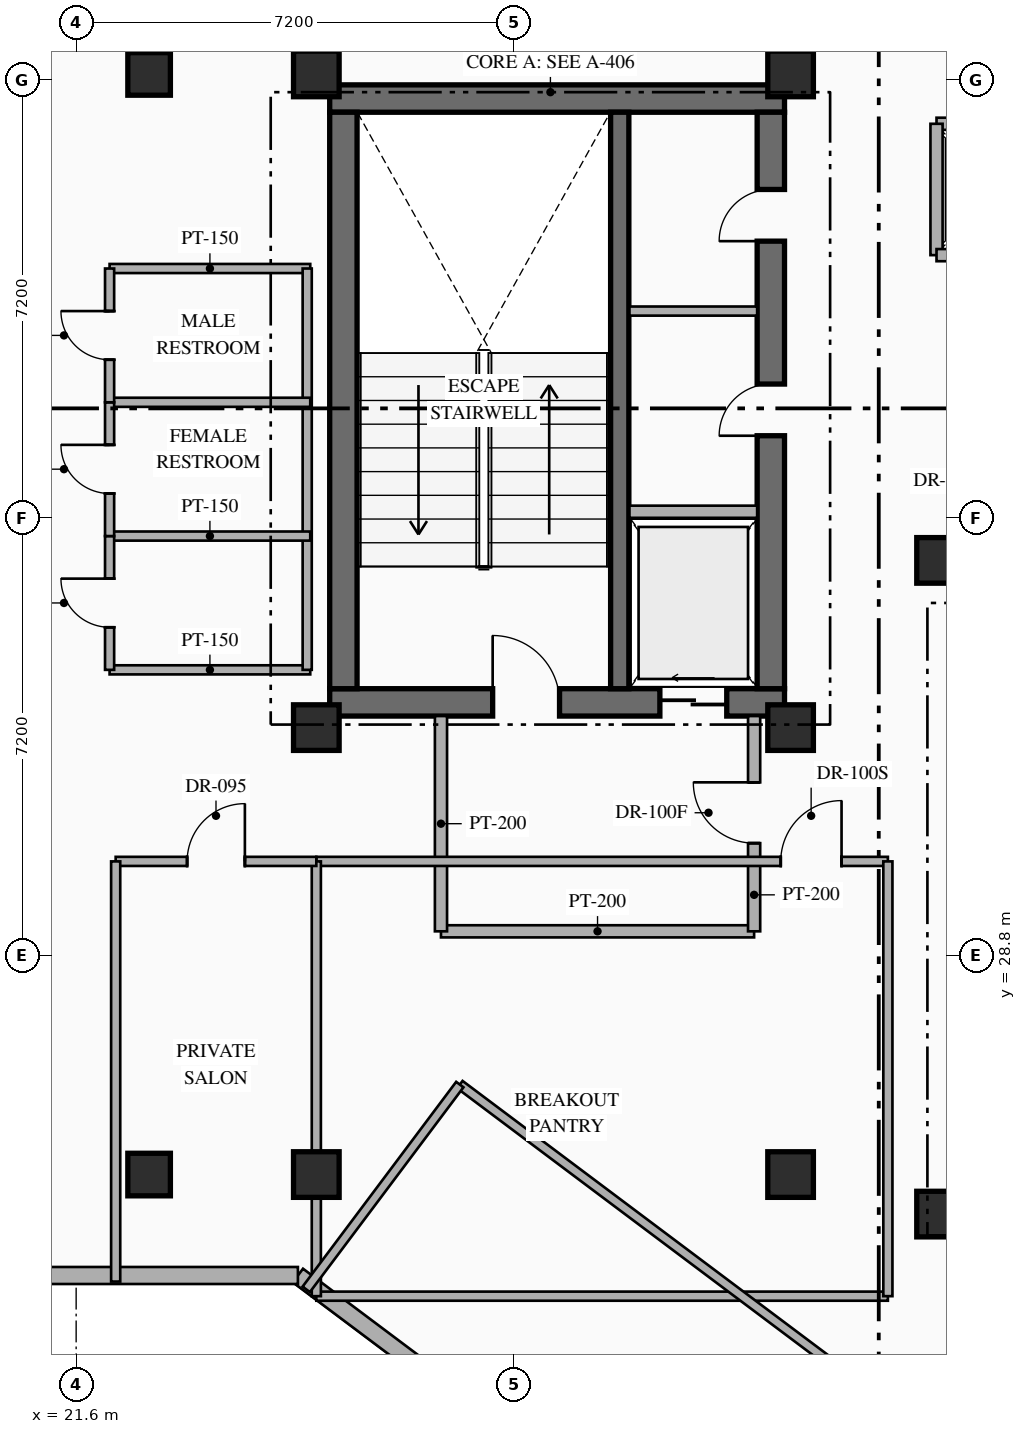
"""IFC4 building model, lengths in metres.
Left out: names, types, materials, properties, quantities, classifications, styles, units other than length and angle.
Written with IfcOpenShell. Run it as: python <this file> out.ifc"""

import sys

from ifc_helpers import new_model, si_unit, direction, frame, frame_2d, origin, origin_2d, place, context, subcontext, project, spatial, rectangle, hollow_rectangle, extrude, element, fill, save


model = new_model("IFC4")
c1 = context("Model", 3, precision=1e-05, world=origin(), true_north=direction((0.0, 1.0)))
c2 = subcontext(c1, "Body", "Model", "MODEL_VIEW")
j1 = project(units=[si_unit("LENGTHUNIT", "METRE"), si_unit("PLANEANGLEUNIT", "RADIAN")], contexts=[c1])
p1 = place(None, origin())
s1 = spatial("IfcSite", under=j1, at=p1, CompositionType="ELEMENT")
p2 = place(p1, origin())
s2 = spatial("IfcBuilding", under=s1, at=p2, CompositionType="ELEMENT")
p3 = place(p2, frame((0.0, 0.0, 191.55)))
s3 = spatial("IfcBuildingStorey", under=s2, at=p3, CompositionType="ELEMENT", Elevation=191.55)
p4 = place(p3, frame((25.77, 32.965, 0.0), z_axis=(0.0, 0.0, 1.0), x_axis=(1.0, 0.0, 0.0)))
e1 = element("IfcWall", 1, at=p4, inside=s3, PredefinedType="SHEAR", context=c2, shape_type="SweptSolid", body=[
    extrude(rectangle(XDim=7.48, YDim=0.45, at=frame_2d((3.74, 0.0))), origin(), (0.0, 0.0, 1.0), 3.6),
])
p5 = place(p4, frame((2.68, 0.0, 0.0)))
e2 = element("IfcOpeningElement", 2, at=p5, cuts=e1, PredefinedType="OPENING", context=c2, shape_type="SweptSolid", body=[
    extrude(rectangle(XDim=1.1, YDim=2.2, at=frame_2d((0.55, 1.1))), frame((0.0, 0.235, 0.0), z_axis=(0.0, -1.0, 0.0), x_axis=(1.0, 0.0, 0.0)), (0.0, 0.0, 1.0), 0.47),
])
p6 = place(p4, frame((5.43, 0.0, 0.0)))
e3 = element("IfcOpeningElement", 3, at=p6, cuts=e1, PredefinedType="OPENING", context=c2, shape_type="SweptSolid", body=[
    extrude(rectangle(XDim=1.1, YDim=2.15, at=frame_2d((0.55, 1.075))), frame((0.0, 0.235, 0.0), z_axis=(0.0, -1.0, 0.0), x_axis=(1.0, 0.0, 0.0)), (0.0, 0.0, 1.0), 0.47),
])
p7 = place(p3, frame((25.77, 42.895, 0.0), z_axis=(0.0, 0.0, 1.0), x_axis=(1.0, 0.0, 0.0)))
e4 = element("IfcWall", 4, at=p7, inside=s3, PredefinedType="SHEAR", context=c2, shape_type="SweptSolid", body=[
    extrude(rectangle(XDim=7.48, YDim=0.45, at=frame_2d((3.74, 0.0))), origin(), (0.0, 0.0, 1.0), 3.6),
])
p8 = place(p3, frame((25.995, 33.19, 0.0), z_axis=(0.0, 0.0, 1.0), x_axis=(0.0, 1.0, 0.0)))
e5 = element("IfcWall", 5, at=p8, inside=s3, PredefinedType="SHEAR", context=c2, shape_type="SweptSolid", body=[
    extrude(rectangle(XDim=9.48, YDim=0.45, at=frame_2d((4.74, 0.0))), origin(), (0.0, 0.0, 1.0), 3.6),
])
p9 = place(p3, frame((33.025, 33.19, 0.0), z_axis=(0.0, 0.0, 1.0), x_axis=(0.0, 1.0, 0.0)))
e6 = element("IfcWall", 6, at=p9, inside=s3, PredefinedType="SHEAR", context=c2, shape_type="SweptSolid", body=[
    extrude(rectangle(XDim=9.48, YDim=0.45, at=frame_2d((4.74, 0.0))), origin(), (0.0, 0.0, 1.0), 3.6),
])
p10 = place(p9, frame((4.16, 0.0, 0.0)))
e7 = element("IfcOpeningElement", 7, at=p10, cuts=e6, PredefinedType="OPENING", context=c2, shape_type="SweptSolid", body=[
    extrude(rectangle(XDim=0.85, YDim=2.08, at=frame_2d((0.425, 1.04))), frame((0.0, 0.235, 0.0), z_axis=(0.0, -1.0, 0.0), x_axis=(1.0, 0.0, 0.0)), (0.0, 0.0, 1.0), 0.47),
])
p11 = place(p9, frame((7.36, 0.0, 0.0)))
e8 = element("IfcOpeningElement", 8, at=p11, cuts=e6, PredefinedType="OPENING", context=c2, shape_type="SweptSolid", body=[
    extrude(rectangle(XDim=0.85, YDim=2.08, at=frame_2d((0.425, 1.04))), frame((0.0, 0.235, 0.0), z_axis=(0.0, -1.0, 0.0), x_axis=(1.0, 0.0, 0.0)), (0.0, 0.0, 1.0), 0.47),
])
p12 = place(p3, frame((30.54, 33.19, 0.0), z_axis=(0.0, 0.0, 1.0), x_axis=(0.0, 1.0, 0.0)))
e9 = element("IfcWall", 9, at=p12, inside=s3, PredefinedType="SHEAR", context=c2, shape_type="SweptSolid", body=[
    extrude(rectangle(XDim=9.48, YDim=0.3, at=frame_2d((4.74, 0.0))), origin(), (0.0, 0.0, 1.0), 3.6),
])
for number, where, z_axis, x_axis in (
    (10, (25.55, 32.55, 0.0), (0.0, 0.0, 1.0), (1.0, 0.0, 0.0)),
    (11, (33.35, 32.55, 0.0), (0.0, 0.0, 1.0), (1.0, 0.0, 0.0)),
    (12, (25.55, 43.3, 0.0), (0.0, 0.0, 1.0), (1.0, 0.0, 0.0)),
    (13, (33.35, 43.3, 0.0), (0.0, 0.0, 1.0), (1.0, 0.0, 0.0)),
    (14, (35.8, 24.55, 0.0), (0.0, 0.0, 1.0), (1.0, 0.0, 0.0)),
    (15, (35.8, 35.3, 0.0), (0.0, 0.0, 1.0), (1.0, 0.0, 0.0)),
    (16, (25.55, 25.2, 0.0), (0.0, 0.0, 1.0), (1.0, 0.0, 0.0)),
    (17, (33.35, 25.2, 0.0), (0.0, 0.0, 1.0), (1.0, 0.0, 0.0)),
):
    element("IfcColumn", number, at=place(p3, frame(where, z_axis=z_axis, x_axis=x_axis)), inside=s3, PredefinedType="COLUMN", context=c2, shape_type="SweptSolid", body=[
        extrude(hollow_rectangle(XDim=0.75, YDim=0.75, WallThickness=0.028, at=origin_2d()), origin(), (0.0, 0.0, 1.0), 3.6),
    ])
for number, where, z_axis, x_axis in (
    (18, (22.8, 25.2, 0.0), (0.0, 0.0, 1.0), (1.0, 0.0, 0.0)),
    (19, (22.8, 43.3, 0.0), (0.0, 0.0, 1.0), (1.0, 0.0, 0.0)),
):
    element("IfcColumn", number, at=place(p3, frame(where, z_axis=z_axis, x_axis=x_axis)), inside=s3, PredefinedType="COLUMN", context=c2, shape_type="SweptSolid", body=[
        extrude(hollow_rectangle(XDim=0.7, YDim=0.7, WallThickness=0.028, at=origin_2d()), origin(), (0.0, 0.0, 1.0), 3.6),
    ])
p13 = place(p3, frame((44.918, 8.787, 0.0), z_axis=(0.0, 0.0, 1.0), x_axis=(-0.800004765927, 0.599993645378, 0.0)))
e20 = element("IfcWall", 20, at=p13, inside=s3, PredefinedType="STANDARD", context=c2, shape_type="SweptSolid", body=[
    extrude(rectangle(XDim=24.588, YDim=0.28, at=frame_2d((12.294, 0.0))), origin(), (0.0, 0.0, 1.0), 3.35),
])
p14 = place(p3, frame((25.247, 23.54, 0.0), z_axis=(0.0, 0.0, 1.0), x_axis=(-1.0, 0.0, 0.0)))
e21 = element("IfcWall", 21, at=p14, inside=s3, PredefinedType="STANDARD", context=c2, shape_type="SweptSolid", body=[
    extrude(rectangle(XDim=4.789, YDim=0.28, at=frame_2d((2.395, 0.0))), origin(), (0.0, 0.0, 1.0), 3.35),
])
p15 = place(p3, frame((30.7, 36.1, 0.0), z_axis=(0.0, 0.0, 1.0), x_axis=(1.0, 0.0, 0.0)))
e22 = element("IfcWall", 22, at=p15, inside=s3, PredefinedType="STANDARD", context=c2, shape_type="SweptSolid", body=[
    extrude(rectangle(XDim=2.1, YDim=0.2, at=frame_2d((1.05, 0.0))), origin(), (0.0, 0.0, 1.0), 3.35),
])
p16 = place(p3, frame((30.7, 39.4, 0.0), z_axis=(0.0, 0.0, 1.0), x_axis=(1.0, 0.0, 0.0)))
e23 = element("IfcWall", 23, at=p16, inside=s3, PredefinedType="PARTITIONING", context=c2, shape_type="SweptSolid", body=[
    extrude(rectangle(XDim=2.1, YDim=0.15, at=frame_2d((1.05, 0.0))), origin(), (0.0, 0.0, 1.0), 3.35),
])
p17 = place(p3, frame((27.6, 29.2, 0.0), z_axis=(0.0, 0.0, 1.0), x_axis=(1.0, 0.0, 0.0)))
e24 = element("IfcWall", 24, at=p17, inside=s3, PredefinedType="STANDARD", context=c2, shape_type="SweptSolid", body=[
    extrude(rectangle(XDim=5.15, YDim=0.2, at=frame_2d((2.575, 0.0))), origin(), (0.0, 0.0, 1.0), 3.35),
])
p18 = place(p3, frame((27.6, 29.2, 0.0), z_axis=(0.0, 0.0, 1.0), x_axis=(0.0, 1.0, 0.0)))
e25 = element("IfcWall", 25, at=p18, inside=s3, PredefinedType="STANDARD", context=c2, shape_type="SweptSolid", body=[
    extrude(rectangle(XDim=3.54, YDim=0.2, at=frame_2d((1.77, 0.0))), origin(), (0.0, 0.0, 1.0), 3.35),
])
p19 = place(p3, frame((32.75, 29.2, 0.0), z_axis=(0.0, 0.0, 1.0), x_axis=(0.0, 1.0, 0.0)))
e26 = element("IfcWall", 26, at=p19, inside=s3, PredefinedType="STANDARD", context=c2, shape_type="SweptSolid", body=[
    extrude(rectangle(XDim=3.54, YDim=0.2, at=frame_2d((1.77, 0.0))), origin(), (0.0, 0.0, 1.0), 3.35),
])
p20 = place(p19, frame((1.45, 0.0, 0.0)))
e27 = element("IfcOpeningElement", 27, at=p20, cuts=e26, PredefinedType="OPENING", context=c2, shape_type="SweptSolid", body=[
    extrude(rectangle(XDim=1.0, YDim=2.2, at=frame_2d((0.5, 1.1))), frame((0.0, 0.11, 0.0), z_axis=(0.0, -1.0, 0.0), x_axis=(1.0, 0.0, 0.0)), (0.0, 0.0, 1.0), 0.22),
])
p21 = place(p3, frame((35.75, 42.48, 0.0), z_axis=(0.0, 0.0, 1.0), x_axis=(1.0, 0.0, 0.0)))
e28 = element("IfcWall", 28, at=p21, inside=s3, PredefinedType="STANDARD", context=c2, shape_type="SweptSolid", body=[
    extrude(rectangle(XDim=9.11, YDim=0.2, at=frame_2d((4.555, 0.0))), origin(), (0.0, 0.0, 1.0), 3.35),
])
p22 = place(p3, frame((35.75, 40.32, 0.0), z_axis=(0.0, 0.0, 1.0), x_axis=(0.0, 1.0, 0.0)))
e29 = element("IfcWall", 29, at=p22, inside=s3, PredefinedType="STANDARD", context=c2, shape_type="SweptSolid", body=[
    extrude(rectangle(XDim=2.16, YDim=0.2, at=frame_2d((1.08, 0.0))), origin(), (0.0, 0.0, 1.0), 3.35),
])
p23 = place(p3, frame((35.75, 40.32, 0.0), z_axis=(0.0, 0.0, 1.0), x_axis=(1.0, 0.0, 0.0)))
e30 = element("IfcWall", 30, at=p23, inside=s3, PredefinedType="STANDARD", context=c2, shape_type="SweptSolid", body=[
    extrude(rectangle(XDim=9.11, YDim=0.2, at=frame_2d((4.555, 0.0))), origin(), (0.0, 0.0, 1.0), 3.35),
])
p24 = place(p23, frame((0.53, 0.0, 0.0)))
e31 = element("IfcOpeningElement", 31, at=p24, cuts=e30, PredefinedType="OPENING", context=c2, shape_type="SweptSolid", body=[
    extrude(rectangle(XDim=1.1, YDim=2.18, at=frame_2d((0.55, 1.09))), frame((0.0, 0.11, 0.0), z_axis=(0.0, -1.0, 0.0), x_axis=(1.0, 0.0, 0.0)), (0.0, 0.0, 1.0), 0.22),
])
p25 = place(p23, frame((2.73, 0.0, 0.0)))
e32 = element("IfcOpeningElement", 32, at=p25, cuts=e30, PredefinedType="OPENING", context=c2, shape_type="SweptSolid", body=[
    extrude(rectangle(XDim=1.1, YDim=2.18, at=frame_2d((0.55, 1.09))), frame((0.0, 0.11, 0.0), z_axis=(0.0, -1.0, 0.0), x_axis=(1.0, 0.0, 0.0)), (0.0, 0.0, 1.0), 0.22),
])
p26 = place(p23, frame((4.93, 0.0, 0.0)))
e33 = element("IfcOpeningElement", 33, at=p26, cuts=e30, PredefinedType="OPENING", context=c2, shape_type="SweptSolid", body=[
    extrude(rectangle(XDim=1.1, YDim=2.18, at=frame_2d((0.55, 1.09))), frame((0.0, 0.11, 0.0), z_axis=(0.0, -1.0, 0.0), x_axis=(1.0, 0.0, 0.0)), (0.0, 0.0, 1.0), 0.22),
])
p27 = place(p23, frame((7.13, 0.0, 0.0)))
e34 = element("IfcOpeningElement", 34, at=p27, cuts=e30, PredefinedType="OPENING", context=c2, shape_type="SweptSolid", body=[
    extrude(rectangle(XDim=1.1, YDim=2.18, at=frame_2d((0.55, 1.09))), frame((0.0, 0.11, 0.0), z_axis=(0.0, -1.0, 0.0), x_axis=(1.0, 0.0, 0.0)), (0.0, 0.0, 1.0), 0.22),
])
for number, where, z_axis, x_axis in (
    (35, (22.15, 33.5, 0.0), (0.0, 0.0, 1.0), (1.0, 0.0, 0.0)),
    (36, (22.15, 40.1, 0.0), (0.0, 0.0, 1.0), (1.0, 0.0, 0.0)),
):
    element("IfcWall", number, at=place(p3, frame(where, z_axis=z_axis, x_axis=x_axis)), inside=s3, PredefinedType="PARTITIONING", context=c2, shape_type="SweptSolid", body=[
        extrude(rectangle(XDim=3.3, YDim=0.15, at=frame_2d((1.65, 0.0))), origin(), (0.0, 0.0, 1.0), 3.35),
    ])
p28 = place(p3, frame((25.4, 33.5, 0.0), z_axis=(0.0, 0.0, 1.0), x_axis=(0.0, 1.0, 0.0)))
e37 = element("IfcWall", 37, at=p28, inside=s3, PredefinedType="PARTITIONING", context=c2, shape_type="SweptSolid", body=[
    extrude(rectangle(XDim=6.6, YDim=0.15, at=frame_2d((3.3, 0.0))), origin(), (0.0, 0.0, 1.0), 3.35),
])
for number, where, z_axis, x_axis in (
    (38, (22.15, 35.7, 0.0), (0.0, 0.0, 1.0), (1.0, 0.0, 0.0)),
    (39, (22.15, 37.9, 0.0), (0.0, 0.0, 1.0), (1.0, 0.0, 0.0)),
):
    element("IfcWall", number, at=place(p3, frame(where, z_axis=z_axis, x_axis=x_axis)), inside=s3, PredefinedType="PARTITIONING", context=c2, shape_type="SweptSolid", body=[
        extrude(rectangle(XDim=3.3, YDim=0.15, at=frame_2d((1.65, 0.0))), origin(), (0.0, 0.0, 1.0), 3.35),
    ])
p29 = place(p3, frame((22.15, 33.5, 0.0), z_axis=(0.0, 0.0, 1.0), x_axis=(0.0, 1.0, 0.0)))
e40 = element("IfcWall", 40, at=p29, inside=s3, PredefinedType="PARTITIONING", context=c2, shape_type="SweptSolid", body=[
    extrude(rectangle(XDim=2.2, YDim=0.15, at=frame_2d((1.1, 0.0))), origin(), (0.0, 0.0, 1.0), 3.35),
])
p30 = place(p29, frame((0.7, 0.0, 0.0)))
e41 = element("IfcOpeningElement", 41, at=p30, cuts=e40, PredefinedType="OPENING", context=c2, shape_type="SweptSolid", body=[
    extrude(rectangle(XDim=0.8, YDim=2.06, at=frame_2d((0.4, 1.03))), frame((0.0, 0.085, 0.0), z_axis=(0.0, -1.0, 0.0), x_axis=(1.0, 0.0, 0.0)), (0.0, 0.0, 1.0), 0.17),
])
p31 = place(p3, frame((22.15, 35.7, 0.0), z_axis=(0.0, 0.0, 1.0), x_axis=(0.0, 1.0, 0.0)))
e42 = element("IfcWall", 42, at=p31, inside=s3, PredefinedType="PARTITIONING", context=c2, shape_type="SweptSolid", body=[
    extrude(rectangle(XDim=2.2, YDim=0.15, at=frame_2d((1.1, 0.0))), origin(), (0.0, 0.0, 1.0), 3.35),
])
p32 = place(p31, frame((0.7, 0.0, 0.0)))
e43 = element("IfcOpeningElement", 43, at=p32, cuts=e42, PredefinedType="OPENING", context=c2, shape_type="SweptSolid", body=[
    extrude(rectangle(XDim=0.8, YDim=2.06, at=frame_2d((0.4, 1.03))), frame((0.0, 0.085, 0.0), z_axis=(0.0, -1.0, 0.0), x_axis=(1.0, 0.0, 0.0)), (0.0, 0.0, 1.0), 0.17),
])
p33 = place(p3, frame((22.15, 37.9, 0.0), z_axis=(0.0, 0.0, 1.0), x_axis=(0.0, 1.0, 0.0)))
e44 = element("IfcWall", 44, at=p33, inside=s3, PredefinedType="PARTITIONING", context=c2, shape_type="SweptSolid", body=[
    extrude(rectangle(XDim=2.2, YDim=0.15, at=frame_2d((1.1, 0.0))), origin(), (0.0, 0.0, 1.0), 3.35),
])
p34 = place(p33, frame((0.7, 0.0, 0.0)))
e45 = element("IfcOpeningElement", 45, at=p34, cuts=e44, PredefinedType="OPENING", context=c2, shape_type="SweptSolid", body=[
    extrude(rectangle(XDim=0.8, YDim=2.06, at=frame_2d((0.4, 1.03))), frame((0.0, 0.085, 0.0), z_axis=(0.0, -1.0, 0.0), x_axis=(1.0, 0.0, 0.0)), (0.0, 0.0, 1.0), 0.17),
])
p35 = place(p3, frame((25.55, 23.2, 0.0), z_axis=(0.0, 0.0, 1.0), x_axis=(1.0, 0.0, 0.0)))
e46 = element("IfcWall", 46, at=p35, inside=s3, PredefinedType="PARTITIONING", context=c2, shape_type="SweptSolid", body=[
    extrude(rectangle(XDim=9.4, YDim=0.15, at=frame_2d((4.7, 0.0))), origin(), (0.0, 0.0, 1.0), 3.35),
])
p36 = place(p3, frame((25.55, 30.35, 0.0), z_axis=(0.0, 0.0, 1.0), x_axis=(1.0, 0.0, 0.0)))
e47 = element("IfcWall", 47, at=p36, inside=s3, PredefinedType="PARTITIONING", context=c2, shape_type="SweptSolid", body=[
    extrude(rectangle(XDim=9.4, YDim=0.15, at=frame_2d((4.7, 0.0))), origin(), (0.0, 0.0, 1.0), 3.35),
])
p37 = place(p36, frame((7.638, 0.0, 0.0)))
e48 = element("IfcOpeningElement", 48, at=p37, cuts=e47, PredefinedType="OPENING", context=c2, shape_type="SweptSolid", body=[
    extrude(rectangle(XDim=1.0, YDim=2.15, at=frame_2d((0.5, 1.075))), frame((0.0, 0.085, 0.0), z_axis=(0.0, -1.0, 0.0), x_axis=(1.0, 0.0, 0.0)), (0.0, 0.0, 1.0), 0.17),
])
p38 = place(p3, frame((25.55, 23.2, 0.0), z_axis=(0.0, 0.0, 1.0), x_axis=(0.0, 1.0, 0.0)))
e49 = element("IfcWall", 49, at=p38, inside=s3, PredefinedType="PARTITIONING", context=c2, shape_type="SweptSolid", body=[
    extrude(rectangle(XDim=7.15, YDim=0.15, at=frame_2d((3.575, 0.0))), origin(), (0.0, 0.0, 1.0), 2.757),
])
p39 = place(p3, frame((34.95, 23.2, 0.0), z_axis=(0.0, 0.0, 1.0), x_axis=(0.0, 1.0, 0.0)))
e50 = element("IfcWall", 50, at=p39, inside=s3, PredefinedType="PARTITIONING", context=c2, shape_type="SweptSolid", body=[
    extrude(rectangle(XDim=7.15, YDim=0.15, at=frame_2d((3.575, 0.0))), origin(), (0.0, 0.0, 1.0), 3.35),
])
p40 = place(p3, frame((22.25, 30.35, 0.0), z_axis=(0.0, 0.0, 1.0), x_axis=(1.0, 0.0, 0.0)))
e51 = element("IfcWall", 51, at=p40, inside=s3, PredefinedType="PARTITIONING", context=c2, shape_type="SweptSolid", body=[
    extrude(rectangle(XDim=3.3, YDim=0.15, at=frame_2d((1.65, 0.0))), origin(), (0.0, 0.0, 1.0), 3.35),
])
p41 = place(p40, frame((1.175, 0.0, 0.0)))
e52 = element("IfcOpeningElement", 52, at=p41, cuts=e51, PredefinedType="OPENING", context=c2, shape_type="SweptSolid", body=[
    extrude(rectangle(XDim=0.95, YDim=2.15, at=frame_2d((0.475, 1.075))), frame((0.0, 0.085, 0.0), z_axis=(0.0, -1.0, 0.0), x_axis=(1.0, 0.0, 0.0)), (0.0, 0.0, 1.0), 0.17),
])
p42 = place(p3, frame((22.25, 23.44, 0.0), z_axis=(0.0, 0.0, 1.0), x_axis=(0.0, 1.0, 0.0)))
e53 = element("IfcWall", 53, at=p42, inside=s3, PredefinedType="PARTITIONING", context=c2, shape_type="SweptSolid", body=[
    extrude(rectangle(XDim=6.91, YDim=0.15, at=frame_2d((3.455, 0.0))), origin(), (0.0, 0.0, 1.0), 3.35),
])
p43 = place(p3, frame((27.91, 26.68, 0.0), z_axis=(0.0, 0.0, 1.0), x_axis=(0.800005938517, -0.599992081896, 0.0)))
e54 = element("IfcWall", 54, at=p43, inside=s3, PredefinedType="PARTITIONING", context=c2, shape_type="SweptSolid", body=[
    extrude(rectangle(XDim=14.8, YDim=0.15, at=frame_2d((7.4, 0.0))), origin(), (0.0, 0.0, 1.0), 3.35),
])
p44 = place(p43, frame((9.281, 0.0, 0.0)))
e55 = element("IfcOpeningElement", 55, at=p44, cuts=e54, PredefinedType="OPENING", context=c2, shape_type="SweptSolid", body=[
    extrude(rectangle(XDim=0.95, YDim=2.15, at=frame_2d((0.475, 1.075))), frame((0.0, 0.085, 0.0), z_axis=(0.0, -1.0, 0.0), x_axis=(1.0, 0.0, 0.0)), (0.0, 0.0, 1.0), 0.17),
])
p45 = place(p3, frame((25.384, 23.312, 0.0), z_axis=(0.0, 0.0, 1.0), x_axis=(0.599990721155, 0.80000695905, 0.0)))
e56 = element("IfcWall", 56, at=p45, inside=s3, PredefinedType="PARTITIONING", context=c2, shape_type="SweptSolid", body=[
    extrude(rectangle(XDim=4.21, YDim=0.15, at=frame_2d((2.105, 0.0))), origin(), (0.0, 0.0, 1.0), 3.35),
])
p46 = place(p5, origin())
e57 = element("IfcDoor", 57, at=p46, inside=s3, OperationType="SINGLE_SWING_LEFT", PredefinedType="DOOR", context=c2, shape_type="SweptSolid", body=[
    extrude(rectangle(XDim=1.1, YDim=2.2, at=frame_2d((0.55, 1.1))), frame((0.0, 0.025, 0.0), z_axis=(0.0, -1.0, 0.0), x_axis=(1.0, 0.0, 0.0)), (0.0, 0.0, 1.0), 0.05),
])
fill(e2, e57)
p47 = place(p6, origin())
e58 = element("IfcDoor", 58, at=p47, inside=s3, OperationType="SLIDING_TO_LEFT", PredefinedType="USERDEFINED", context=c2, shape_type="SweptSolid", body=[
    extrude(rectangle(XDim=1.1, YDim=2.15, at=frame_2d((0.55, 1.075))), frame((0.0, 0.025, 0.0), z_axis=(0.0, -1.0, 0.0), x_axis=(1.0, 0.0, 0.0)), (0.0, 0.0, 1.0), 0.05),
])
fill(e3, e58)
p48 = place(p10, origin())
e59 = element("IfcDoor", 59, at=p48, inside=s3, OperationType="SINGLE_SWING_LEFT", PredefinedType="DOOR", context=c2, shape_type="SweptSolid", body=[
    extrude(rectangle(XDim=0.85, YDim=2.08, at=frame_2d((0.425, 1.04))), frame((0.0, 0.025, 0.0), z_axis=(0.0, -1.0, 0.0), x_axis=(1.0, 0.0, 0.0)), (0.0, 0.0, 1.0), 0.05),
])
fill(e7, e59)
p49 = place(p11, origin())
e60 = element("IfcDoor", 60, at=p49, inside=s3, OperationType="SINGLE_SWING_LEFT", PredefinedType="DOOR", context=c2, shape_type="SweptSolid", body=[
    extrude(rectangle(XDim=0.85, YDim=2.08, at=frame_2d((0.425, 1.04))), frame((0.0, 0.025, 0.0), z_axis=(0.0, -1.0, 0.0), x_axis=(1.0, 0.0, 0.0)), (0.0, 0.0, 1.0), 0.05),
])
fill(e8, e60)
p50 = place(p20, origin())
e61 = element("IfcDoor", 61, at=p50, inside=s3, OperationType="SINGLE_SWING_RIGHT", PredefinedType="DOOR", context=c2, shape_type="SweptSolid", body=[
    extrude(rectangle(XDim=1.0, YDim=2.2, at=frame_2d((0.5, 1.1))), frame((0.0, 0.025, 0.0), z_axis=(0.0, -1.0, 0.0), x_axis=(1.0, 0.0, 0.0)), (0.0, 0.0, 1.0), 0.05),
])
fill(e27, e61)
p51 = place(p30, origin())
e62 = element("IfcDoor", 62, at=p51, inside=s3, OperationType="SINGLE_SWING_RIGHT", PredefinedType="DOOR", context=c2, shape_type="SweptSolid", body=[
    extrude(rectangle(XDim=0.8, YDim=2.06, at=frame_2d((0.4, 1.03))), frame((0.0, 0.025, 0.0), z_axis=(0.0, -1.0, 0.0), x_axis=(1.0, 0.0, 0.0)), (0.0, 0.0, 1.0), 0.05),
])
fill(e41, e62)
p52 = place(p32, origin())
e63 = element("IfcDoor", 63, at=p52, inside=s3, OperationType="SINGLE_SWING_RIGHT", PredefinedType="DOOR", context=c2, shape_type="SweptSolid", body=[
    extrude(rectangle(XDim=0.8, YDim=2.06, at=frame_2d((0.4, 1.03))), frame((0.0, 0.025, 0.0), z_axis=(0.0, -1.0, 0.0), x_axis=(1.0, 0.0, 0.0)), (0.0, 0.0, 1.0), 0.05),
])
fill(e43, e63)
p53 = place(p34, origin())
e64 = element("IfcDoor", 64, at=p53, inside=s3, OperationType="SINGLE_SWING_RIGHT", PredefinedType="DOOR", context=c2, shape_type="SweptSolid", body=[
    extrude(rectangle(XDim=0.8, YDim=2.06, at=frame_2d((0.4, 1.03))), frame((0.0, 0.025, 0.0), z_axis=(0.0, -1.0, 0.0), x_axis=(1.0, 0.0, 0.0)), (0.0, 0.0, 1.0), 0.05),
])
fill(e45, e64)
p54 = place(p37, origin())
e65 = element("IfcDoor", 65, at=p54, inside=s3, OperationType="SINGLE_SWING_RIGHT", PredefinedType="DOOR", context=c2, shape_type="SweptSolid", body=[
    extrude(rectangle(XDim=1.0, YDim=2.15, at=frame_2d((0.5, 1.075))), frame((0.0, 0.025, 0.0), z_axis=(0.0, -1.0, 0.0), x_axis=(1.0, 0.0, 0.0)), (0.0, 0.0, 1.0), 0.05),
])
fill(e48, e65)
p55 = place(p41, origin())
e66 = element("IfcDoor", 66, at=p55, inside=s3, OperationType="SINGLE_SWING_RIGHT", PredefinedType="DOOR", context=c2, shape_type="SweptSolid", body=[
    extrude(rectangle(XDim=0.95, YDim=2.15, at=frame_2d((0.475, 1.075))), frame((0.0, 0.025, 0.0), z_axis=(0.0, -1.0, 0.0), x_axis=(1.0, 0.0, 0.0)), (0.0, 0.0, 1.0), 0.05),
])
fill(e52, e66)
save(model, sys.argv[1])
